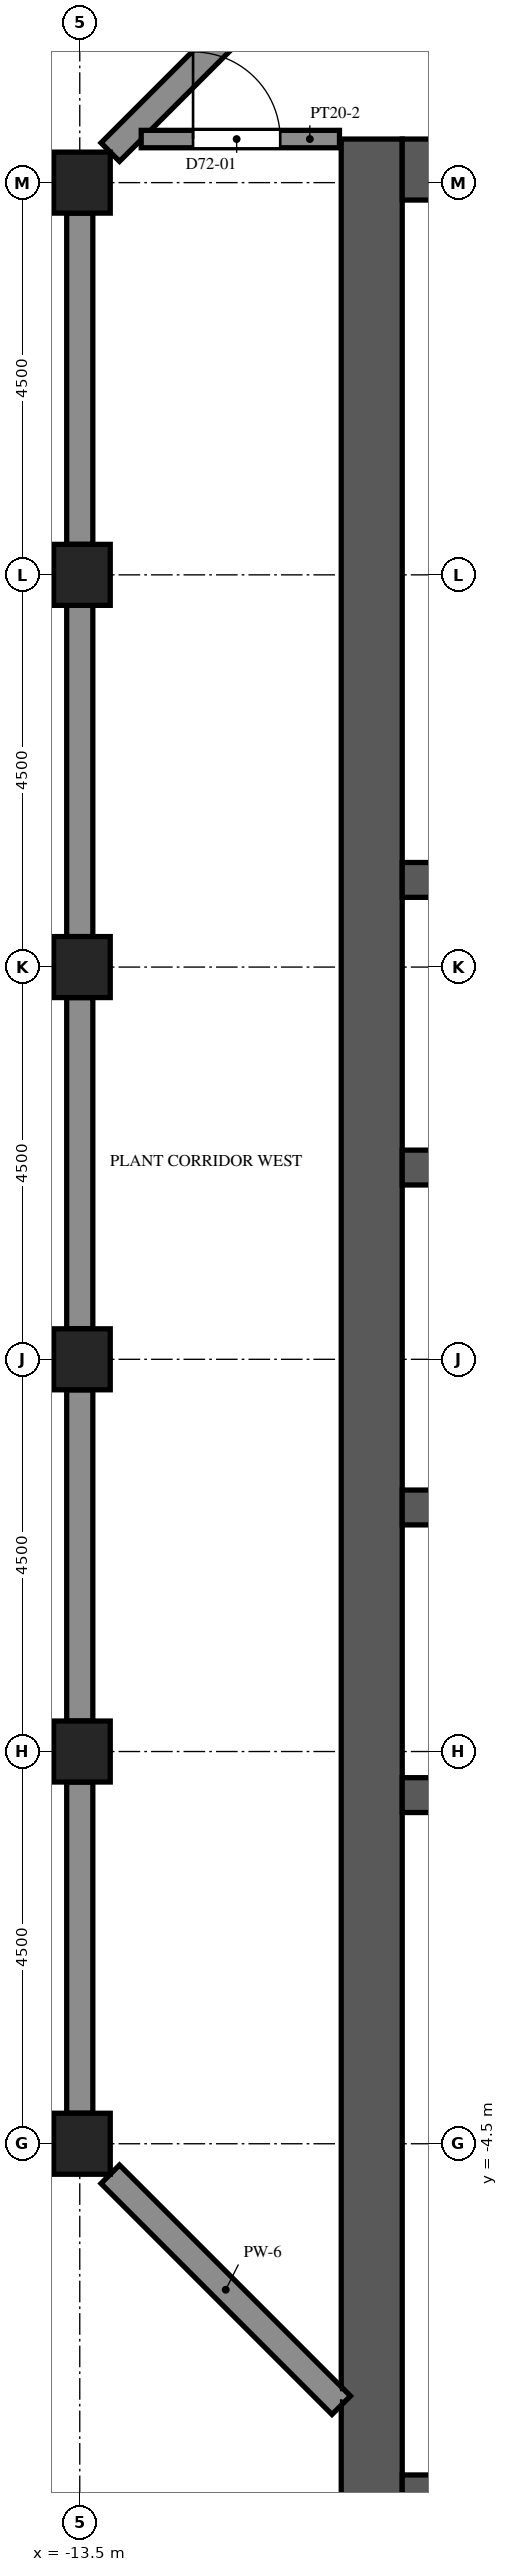
"""IFC4 building model, lengths in metres.
Left out: names, types, materials, properties, quantities, classifications, styles, units other than length and angle.
Written with IfcOpenShell. Run it as: python <this file> out.ifc"""

import sys

from ifc_helpers import new_model, si_unit, direction, frame, frame_2d, origin, origin_2d, place, context, subcontext, project, spatial, rectangle, extrude, element, fill, save


model = new_model("IFC4")
c1 = context("Model", 3, precision=1e-05, world=origin(), true_north=direction((0.0, 1.0)))
c2 = subcontext(c1, "Body", "Model", "MODEL_VIEW")
j1 = project(units=[si_unit("LENGTHUNIT", "METRE"), si_unit("PLANEANGLEUNIT", "RADIAN")], contexts=[c1])
p1 = place(None, origin())
s1 = spatial("IfcSite", under=j1, at=p1, CompositionType="ELEMENT")
p2 = place(p1, origin())
s2 = spatial("IfcBuilding", under=s1, at=p2, CompositionType="ELEMENT")
p3 = place(p2, frame((0.0, 0.0, 321.4)))
s3 = spatial("IfcBuildingStorey", under=s2, at=p3, CompositionType="ELEMENT", Elevation=321.4)
for number, where, z_axis, x_axis in (
    (1, (-13.5, -4.5, 0.0), (0.0, 0.0, 1.0), (1.0, 0.0, 0.0)),
    (2, (-13.5, 0.0, 0.0), (0.0, 0.0, 1.0), (1.0, 0.0, 0.0)),
    (3, (-13.5, 4.5, 0.0), (0.0, 0.0, 1.0), (1.0, 0.0, 0.0)),
    (4, (-13.5, 9.0, 0.0), (0.0, 0.0, 1.0), (1.0, 0.0, 0.0)),
    (5, (-13.5, 13.5, 0.0), (0.0, 0.0, 1.0), (1.0, 0.0, 0.0)),
    (6, (-13.5, 18.0, 0.0), (0.0, 0.0, 1.0), (1.0, 0.0, 0.0)),
):
    element("IfcColumn", number, at=place(p3, frame(where, z_axis=z_axis, x_axis=x_axis)), inside=s3, PredefinedType="COLUMN", context=c2, shape_type="SweptSolid", body=[
        extrude(rectangle(XDim=0.7, YDim=0.7, at=origin_2d()), origin(), (0.0, 0.0, 1.0), 4.8),
    ])
p4 = place(p3, frame((-10.15, -9.0, 0.0), z_axis=(0.0, 0.0, 1.0), x_axis=(0.0, 1.0, 0.0)))
e7 = element("IfcWall", 7, at=p4, inside=s3, PredefinedType="SHEAR", context=c2, shape_type="SweptSolid", body=[
    extrude(rectangle(XDim=27.5, YDim=0.7, at=frame_2d((13.75, 0.0))), origin(), (0.0, 0.0, 1.0), 4.8),
])
p5 = place(p4, frame((12.55, 0.0, 0.0)))
e8 = element("IfcOpeningElement", 8, at=p5, cuts=e7, PredefinedType="OPENING", context=c2, shape_type="SweptSolid", body=[
    extrude(rectangle(XDim=2.4, YDim=2.4, at=frame_2d((1.2, 1.2))), frame((0.0, 0.36, 0.0), z_axis=(0.0, -1.0, 0.0), x_axis=(1.0, 0.0, 0.0)), (0.0, 0.0, 1.0), 0.72),
])
p6 = place(p4, frame((6.825, 0.0, 0.0)))
e9 = element("IfcOpeningElement", 9, at=p6, cuts=e7, PredefinedType="OPENING", context=c2, shape_type="SweptSolid", body=[
    extrude(rectangle(XDim=1.2, YDim=2.1, at=frame_2d((0.6, 1.05))), frame((0.0, 0.36, 0.0), z_axis=(0.0, -1.0, 0.0), x_axis=(1.0, 0.0, 0.0)), (0.0, 0.0, 1.0), 0.72),
])
p7 = place(p4, frame((19.475, 0.0, 0.0)))
e10 = element("IfcOpeningElement", 10, at=p7, cuts=e7, PredefinedType="OPENING", context=c2, shape_type="SweptSolid", body=[
    extrude(rectangle(XDim=1.2, YDim=2.1, at=frame_2d((0.6, 1.05))), frame((0.0, 0.36, 0.0), z_axis=(0.0, -1.0, 0.0), x_axis=(1.0, 0.0, 0.0)), (0.0, 0.0, 1.0), 0.72),
])
for number, where, z_axis, x_axis in (
    (11, (-9.8, -8.65, 0.0), (0.0, 0.0, 1.0), (1.0, 0.0, 0.0)),
    (12, (-9.8, 18.15, 0.0), (0.0, 0.0, 1.0), (1.0, 0.0, 0.0)),
):
    element("IfcWall", number, at=place(p3, frame(where, z_axis=z_axis, x_axis=x_axis)), inside=s3, PredefinedType="SHEAR", context=c2, shape_type="SweptSolid", body=[
        extrude(rectangle(XDim=10.6, YDim=0.7, at=frame_2d((5.3, 0.0))), origin(), (0.0, 0.0, 1.0), 4.8),
    ])
p8 = place(p3, frame((-9.8, -0.5, 0.0), z_axis=(0.0, 0.0, 1.0), x_axis=(1.0, 0.0, 0.0)))
e13 = element("IfcWall", 13, at=p8, inside=s3, PredefinedType="SHEAR", context=c2, shape_type="SweptSolid", body=[
    extrude(rectangle(XDim=10.6, YDim=0.4, at=frame_2d((5.3, 0.0))), origin(), (0.0, 0.0, 1.0), 4.8),
])
p9 = place(p3, frame((-9.8, 2.8, 0.0), z_axis=(0.0, 0.0, 1.0), x_axis=(1.0, 0.0, 0.0)))
e14 = element("IfcWall", 14, at=p9, inside=s3, PredefinedType="SHEAR", context=c2, shape_type="SweptSolid", body=[
    extrude(rectangle(XDim=10.6, YDim=0.4, at=frame_2d((5.3, 0.0))), origin(), (0.0, 0.0, 1.0), 4.8),
])
p10 = place(p9, frame((0.688, 0.0, 0.0)))
e15 = element("IfcOpeningElement", 15, at=p10, cuts=e14, PredefinedType="OPENING", context=c2, shape_type="SweptSolid", body=[
    extrude(rectangle(XDim=1.1, YDim=2.1, at=frame_2d((0.55, 1.05))), frame((0.0, 0.21, 0.0), z_axis=(0.0, -1.0, 0.0), x_axis=(1.0, 0.0, 0.0)), (0.0, 0.0, 1.0), 0.42),
])
p11 = place(p9, frame((3.438, 0.0, 0.0)))
e16 = element("IfcOpeningElement", 16, at=p11, cuts=e14, PredefinedType="OPENING", context=c2, shape_type="SweptSolid", body=[
    extrude(rectangle(XDim=1.1, YDim=2.1, at=frame_2d((0.55, 1.05))), frame((0.0, 0.21, 0.0), z_axis=(0.0, -1.0, 0.0), x_axis=(1.0, 0.0, 0.0)), (0.0, 0.0, 1.0), 0.42),
])
p12 = place(p9, frame((6.113, 0.0, 0.0)))
e17 = element("IfcOpeningElement", 17, at=p12, cuts=e14, PredefinedType="OPENING", context=c2, shape_type="SweptSolid", body=[
    extrude(rectangle(XDim=1.0, YDim=2.1, at=frame_2d((0.5, 1.05))), frame((0.0, 0.21, 0.0), z_axis=(0.0, -1.0, 0.0), x_axis=(1.0, 0.0, 0.0)), (0.0, 0.0, 1.0), 0.42),
])
p13 = place(p9, frame((8.863, 0.0, 0.0)))
e18 = element("IfcOpeningElement", 18, at=p13, cuts=e14, PredefinedType="OPENING", context=c2, shape_type="SweptSolid", body=[
    extrude(rectangle(XDim=1.0, YDim=2.1, at=frame_2d((0.5, 1.05))), frame((0.0, 0.21, 0.0), z_axis=(0.0, -1.0, 0.0), x_axis=(1.0, 0.0, 0.0)), (0.0, 0.0, 1.0), 0.42),
])
p14 = place(p3, frame((-9.8, 6.7, 0.0), z_axis=(0.0, 0.0, 1.0), x_axis=(1.0, 0.0, 0.0)))
e19 = element("IfcWall", 19, at=p14, inside=s3, PredefinedType="SHEAR", context=c2, shape_type="SweptSolid", body=[
    extrude(rectangle(XDim=10.6, YDim=0.4, at=frame_2d((5.3, 0.0))), origin(), (0.0, 0.0, 1.0), 4.8),
])
p15 = place(p14, frame((0.738, 0.0, 0.0)))
e20 = element("IfcOpeningElement", 20, at=p15, cuts=e19, PredefinedType="OPENING", context=c2, shape_type="SweptSolid", body=[
    extrude(rectangle(XDim=1.0, YDim=2.1, at=frame_2d((0.5, 1.05))), frame((0.0, 0.21, 0.0), z_axis=(0.0, -1.0, 0.0), x_axis=(1.0, 0.0, 0.0)), (0.0, 0.0, 1.0), 0.42),
])
p16 = place(p14, frame((3.488, 0.0, 0.0)))
e21 = element("IfcOpeningElement", 21, at=p16, cuts=e19, PredefinedType="OPENING", context=c2, shape_type="SweptSolid", body=[
    extrude(rectangle(XDim=1.0, YDim=2.1, at=frame_2d((0.5, 1.05))), frame((0.0, 0.21, 0.0), z_axis=(0.0, -1.0, 0.0), x_axis=(1.0, 0.0, 0.0)), (0.0, 0.0, 1.0), 0.42),
])
p17 = place(p14, frame((6.113, 0.0, 0.0)))
e22 = element("IfcOpeningElement", 22, at=p17, cuts=e19, PredefinedType="OPENING", context=c2, shape_type="SweptSolid", body=[
    extrude(rectangle(XDim=1.0, YDim=2.1, at=frame_2d((0.5, 1.05))), frame((0.0, 0.21, 0.0), z_axis=(0.0, -1.0, 0.0), x_axis=(1.0, 0.0, 0.0)), (0.0, 0.0, 1.0), 0.42),
])
p18 = place(p14, frame((8.863, 0.0, 0.0)))
e23 = element("IfcOpeningElement", 23, at=p18, cuts=e19, PredefinedType="OPENING", context=c2, shape_type="SweptSolid", body=[
    extrude(rectangle(XDim=1.0, YDim=2.1, at=frame_2d((0.5, 1.05))), frame((0.0, 0.21, 0.0), z_axis=(0.0, -1.0, 0.0), x_axis=(1.0, 0.0, 0.0)), (0.0, 0.0, 1.0), 0.42),
])
p19 = place(p3, frame((-9.8, 10.0, 0.0), z_axis=(0.0, 0.0, 1.0), x_axis=(1.0, 0.0, 0.0)))
e24 = element("IfcWall", 24, at=p19, inside=s3, PredefinedType="SHEAR", context=c2, shape_type="SweptSolid", body=[
    extrude(rectangle(XDim=10.6, YDim=0.4, at=frame_2d((5.3, 0.0))), origin(), (0.0, 0.0, 1.0), 4.8),
])
p20 = place(p3, frame((-9.35, 22.15, 0.0), z_axis=(0.0, 0.0, 1.0), x_axis=(-0.707106781187, -0.707106781187, 0.0)))
e25 = element("IfcWall", 25, at=p20, inside=s3, PredefinedType="SOLIDWALL", context=c2, shape_type="SweptSolid", body=[
    extrude(rectangle(XDim=5.374, YDim=0.3, at=frame_2d((2.687, 0.0))), origin(), (0.0, 0.0, 1.0), 3.5),
])
for number, where, z_axis, x_axis in (
    (26, (-13.5, 17.65, 0.0), (0.0, 0.0, 1.0), (0.0, -1.0, 0.0)),
    (27, (-13.5, 13.15, 0.0), (0.0, 0.0, 1.0), (0.0, -1.0, 0.0)),
    (28, (-13.5, 8.65, 0.0), (0.0, 0.0, 1.0), (0.0, -1.0, 0.0)),
    (29, (-13.5, 4.15, 0.0), (0.0, 0.0, 1.0), (0.0, -1.0, 0.0)),
    (30, (-13.5, -0.35, 0.0), (0.0, 0.0, 1.0), (0.0, -1.0, 0.0)),
):
    element("IfcWall", number, at=place(p3, frame(where, z_axis=z_axis, x_axis=x_axis)), inside=s3, PredefinedType="SOLIDWALL", context=c2, shape_type="SweptSolid", body=[
        extrude(rectangle(XDim=3.8, YDim=0.3, at=frame_2d((1.9, 0.0))), origin(), (0.0, 0.0, 1.0), 0.85),
    ])
p21 = place(p3, frame((-13.15, -4.85, 0.0), z_axis=(0.0, 0.0, 1.0), x_axis=(0.707106781187, -0.707106781187, 0.0)))
e31 = element("IfcWall", 31, at=p21, inside=s3, PredefinedType="SOLIDWALL", context=c2, shape_type="SweptSolid", body=[
    extrude(rectangle(XDim=3.748, YDim=0.3, at=frame_2d((1.874, 0.0))), origin(), (0.0, 0.0, 1.0), 3.5),
])
p22 = place(p3, frame((-12.795, 18.5, 0.0), z_axis=(0.0, 0.0, 1.0), x_axis=(1.0, 0.0, 0.0)))
e32 = element("IfcWall", 32, at=p22, inside=s3, PredefinedType="PARTITIONING", context=c2, shape_type="SweptSolid", body=[
    extrude(rectangle(XDim=2.275, YDim=0.2, at=frame_2d((1.137, 0.0))), origin(), (0.0, 0.0, 1.0), 4.2),
])
p23 = place(p22, frame((0.595, 0.0, 0.0)))
e33 = element("IfcOpeningElement", 33, at=p23, cuts=e32, PredefinedType="OPENING", context=c2, shape_type="SweptSolid", body=[
    extrude(rectangle(XDim=1.0, YDim=2.1, at=frame_2d((0.5, 1.05))), frame((0.0, 0.11, 0.0), z_axis=(0.0, -1.0, 0.0), x_axis=(1.0, 0.0, 0.0)), (0.0, 0.0, 1.0), 0.22),
])
p24 = place(p23, origin())
e34 = element("IfcDoor", 34, at=p24, inside=s3, OperationType="SINGLE_SWING_LEFT", PredefinedType="DOOR", context=c2, shape_type="SweptSolid", body=[
    extrude(rectangle(XDim=1.0, YDim=2.1, at=frame_2d((0.5, 1.05))), frame((0.0, 0.025, 0.0), z_axis=(0.0, -1.0, 0.0), x_axis=(1.0, 0.0, 0.0)), (0.0, 0.0, 1.0), 0.05),
])
fill(e33, e34)
p25 = place(p5, origin())
e35 = element("IfcDoor", 35, at=p25, inside=s3, OperationType="DOUBLE_DOOR_DOUBLE_SWING", PredefinedType="DOOR", context=c2, shape_type="SweptSolid", body=[
    extrude(rectangle(XDim=2.4, YDim=2.4, at=frame_2d((1.2, 1.2))), frame((0.0, 0.025, 0.0), z_axis=(0.0, -1.0, 0.0), x_axis=(1.0, 0.0, 0.0)), (0.0, 0.0, 1.0), 0.05),
])
fill(e8, e35)
p26 = place(p6, origin())
e36 = element("IfcDoor", 36, at=p26, inside=s3, OperationType="SINGLE_SWING_LEFT", PredefinedType="DOOR", context=c2, shape_type="SweptSolid", body=[
    extrude(rectangle(XDim=1.2, YDim=2.1, at=frame_2d((0.6, 1.05))), frame((0.0, 0.025, 0.0), z_axis=(0.0, -1.0, 0.0), x_axis=(1.0, 0.0, 0.0)), (0.0, 0.0, 1.0), 0.05),
])
fill(e9, e36)
p27 = place(p7, origin())
e37 = element("IfcDoor", 37, at=p27, inside=s3, OperationType="SINGLE_SWING_LEFT", PredefinedType="DOOR", context=c2, shape_type="SweptSolid", body=[
    extrude(rectangle(XDim=1.2, YDim=2.1, at=frame_2d((0.6, 1.05))), frame((0.0, 0.025, 0.0), z_axis=(0.0, -1.0, 0.0), x_axis=(1.0, 0.0, 0.0)), (0.0, 0.0, 1.0), 0.05),
])
fill(e10, e37)
save(model, sys.argv[1])
